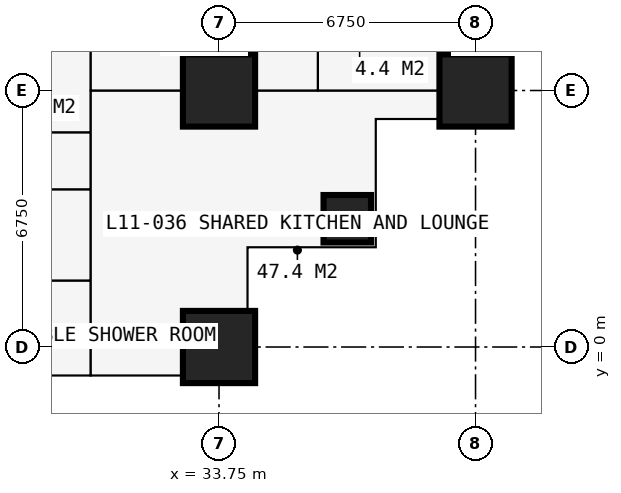
"""IFC4 building model, lengths in metres.
Left out: names, types, materials, properties, quantities, classifications, styles, units other than length and angle.
Written with IfcOpenShell. Run it as: python <this file> out.ifc"""

import sys

from ifc_helpers import new_model, si_unit, direction, frame, frame_2d, origin, origin_2d, place, context, subcontext, project, spatial, rectangle, extrude, element, fill, save


model = new_model("IFC4")
c1 = context("Model", 3, precision=1e-05, world=origin(), true_north=direction((0.0, 1.0)))
c2 = subcontext(c1, "Body", "Model", "MODEL_VIEW")
j1 = project(units=[si_unit("LENGTHUNIT", "METRE"), si_unit("PLANEANGLEUNIT", "RADIAN")], contexts=[c1])
p1 = place(None, origin())
s1 = spatial("IfcSite", under=j1, at=p1, CompositionType="ELEMENT")
p2 = place(p1, origin())
s2 = spatial("IfcBuilding", under=s1, at=p2, CompositionType="ELEMENT")
p3 = place(p2, frame((0.0, 0.0, 43.2)))
s3 = spatial("IfcBuildingStorey", under=s2, at=p3, CompositionType="ELEMENT", Elevation=43.2)
for number, where, z_axis, x_axis in (
    (1, (33.75, 0.0, 0.0), (0.0, 0.0, 1.0), (1.0, 0.0, 0.0)),
    (2, (33.75, 6.75, 0.0), (0.0, 0.0, 1.0), (1.0, 0.0, 0.0)),
):
    element("IfcColumn", number, at=place(p3, frame(where, z_axis=z_axis, x_axis=x_axis)), inside=s3, PredefinedType="COLUMN", context=c2, shape_type="SweptSolid", body=[
        extrude(rectangle(XDim=1.9, YDim=1.9, at=origin_2d()), origin(), (0.0, 0.0, 1.0), 3.6),
    ])
p4 = place(p3, frame((37.125, 3.375, 0.0), z_axis=(0.0, 0.0, 1.0), x_axis=(1.0, 0.0, 0.0)))
e3 = element("IfcColumn", 3, at=p4, inside=s3, PredefinedType="COLUMN", context=c2, shape_type="SweptSolid", body=[
    extrude(rectangle(XDim=1.25, YDim=1.25, at=origin_2d()), origin(), (0.0, 0.0, 1.0), 3.6),
])
p5 = place(p3, frame((40.5, 6.75, 0.0), z_axis=(0.0, 0.0, 1.0), x_axis=(1.0, 0.0, 0.0)))
e4 = element("IfcColumn", 4, at=p5, inside=s3, PredefinedType="COLUMN", context=c2, shape_type="SweptSolid", body=[
    extrude(rectangle(XDim=1.9, YDim=1.9, at=origin_2d()), origin(), (0.0, 0.0, 1.0), 3.6),
])
p6 = place(p3, frame((34.5, -0.75, 0.0), z_axis=(0.0, 0.0, 1.0), x_axis=(0.0, 1.0, 0.0)))
e5 = element("IfcWall", 5, at=p6, inside=s3, PredefinedType="SOLIDWALL", context=c2, shape_type="SweptSolid", body=[
    extrude(rectangle(XDim=3.375, YDim=0.3, at=frame_2d((1.688, 0.0))), origin(), (0.0, 0.0, 1.0), 3.375),
])
p7 = place(p6, frame((1.857, 0.0, 0.9)))
e6 = element("IfcOpeningElement", 6, at=p7, cuts=e5, PredefinedType="OPENING", context=c2, shape_type="SweptSolid", body=[
    extrude(rectangle(XDim=1.2, YDim=1.8, at=frame_2d((0.6, 0.9))), frame((0.0, 0.16, 0.0), z_axis=(0.0, -1.0, 0.0), x_axis=(1.0, 0.0, 0.0)), (0.0, 0.0, 1.0), 0.32),
])
p8 = place(p3, frame((34.5, 2.625, 0.0), z_axis=(0.0, 0.0, 1.0), x_axis=(1.0, 0.0, 0.0)))
e7 = element("IfcWall", 7, at=p8, inside=s3, PredefinedType="SOLIDWALL", context=c2, shape_type="SweptSolid", body=[
    extrude(rectangle(XDim=3.375, YDim=0.3, at=frame_2d((1.688, 0.0))), origin(), (0.0, 0.0, 1.0), 3.375),
])
p9 = place(p8, frame((0.788, 0.0, 0.6)))
e8 = element("IfcOpeningElement", 8, at=p9, cuts=e7, PredefinedType="OPENING", context=c2, shape_type="SweptSolid", body=[
    extrude(rectangle(XDim=1.8, YDim=2.1, at=frame_2d((0.9, 1.05))), frame((0.0, 0.16, 0.0), z_axis=(0.0, -1.0, 0.0), x_axis=(1.0, 0.0, 0.0)), (0.0, 0.0, 1.0), 0.32),
])
p10 = place(p3, frame((37.875, 2.625, 0.0), z_axis=(0.0, 0.0, 1.0), x_axis=(0.0, 1.0, 0.0)))
e9 = element("IfcWall", 9, at=p10, inside=s3, PredefinedType="SOLIDWALL", context=c2, shape_type="SweptSolid", body=[
    extrude(rectangle(XDim=3.375, YDim=0.3, at=frame_2d((1.688, 0.0))), origin(), (0.0, 0.0, 1.0), 3.375),
])
p11 = place(p10, frame((0.788, 0.0, 0.6)))
e10 = element("IfcOpeningElement", 10, at=p11, cuts=e9, PredefinedType="OPENING", context=c2, shape_type="SweptSolid", body=[
    extrude(rectangle(XDim=1.8, YDim=2.1, at=frame_2d((0.9, 1.05))), frame((0.0, 0.16, 0.0), z_axis=(0.0, -1.0, 0.0), x_axis=(1.0, 0.0, 0.0)), (0.0, 0.0, 1.0), 0.32),
])
p12 = place(p3, frame((37.875, 6.0, 0.0), z_axis=(0.0, 0.0, 1.0), x_axis=(1.0, 0.0, 0.0)))
e11 = element("IfcWall", 11, at=p12, inside=s3, PredefinedType="SOLIDWALL", context=c2, shape_type="SweptSolid", body=[
    extrude(rectangle(XDim=3.375, YDim=0.3, at=frame_2d((1.688, 0.0))), origin(), (0.0, 0.0, 1.0), 3.375),
])
p13 = place(p12, frame((0.317, 0.0, 0.9)))
e12 = element("IfcOpeningElement", 12, at=p13, cuts=e11, PredefinedType="OPENING", context=c2, shape_type="SweptSolid", body=[
    extrude(rectangle(XDim=1.2, YDim=1.8, at=frame_2d((0.6, 0.9))), frame((0.0, 0.16, 0.0), z_axis=(0.0, -1.0, 0.0), x_axis=(1.0, 0.0, 0.0)), (0.0, 0.0, 1.0), 0.32),
])
p14 = place(p3, frame((6.75, 4.15, 0.0), z_axis=(0.0, 0.0, 1.0), x_axis=(1.0, 0.0, 0.0)))
e13 = element("IfcWall", 13, at=p14, inside=s3, PredefinedType="PARTITIONING", context=c2, shape_type="SweptSolid", body=[
    extrude(rectangle(XDim=23.625, YDim=0.1, at=frame_2d((11.812, 0.0))), origin(), (0.0, 0.0, 1.0), 3.375),
])
p15 = place(p14, frame((0.2, 0.0, 0.0)))
e14 = element("IfcOpeningElement", 14, at=p15, cuts=e13, PredefinedType="OPENING", context=c2, shape_type="SweptSolid", body=[
    extrude(rectangle(XDim=0.95, YDim=2.2, at=frame_2d((0.475, 1.1))), frame((0.0, 0.06, 0.0), z_axis=(0.0, -1.0, 0.0), x_axis=(1.0, 0.0, 0.0)), (0.0, 0.0, 1.0), 0.12),
])
p16 = place(p14, frame((3.625, 0.0, 0.0)))
e15 = element("IfcOpeningElement", 15, at=p16, cuts=e13, PredefinedType="OPENING", context=c2, shape_type="SweptSolid", body=[
    extrude(rectangle(XDim=0.95, YDim=2.2, at=frame_2d((0.475, 1.1))), frame((0.0, 0.06, 0.0), z_axis=(0.0, -1.0, 0.0), x_axis=(1.0, 0.0, 0.0)), (0.0, 0.0, 1.0), 0.12),
])
p17 = place(p14, frame((7.0, 0.0, 0.0)))
e16 = element("IfcOpeningElement", 16, at=p17, cuts=e13, PredefinedType="OPENING", context=c2, shape_type="SweptSolid", body=[
    extrude(rectangle(XDim=0.95, YDim=2.2, at=frame_2d((0.475, 1.1))), frame((0.0, 0.06, 0.0), z_axis=(0.0, -1.0, 0.0), x_axis=(1.0, 0.0, 0.0)), (0.0, 0.0, 1.0), 0.12),
])
p18 = place(p14, frame((10.375, 0.0, 0.0)))
e17 = element("IfcOpeningElement", 17, at=p18, cuts=e13, PredefinedType="OPENING", context=c2, shape_type="SweptSolid", body=[
    extrude(rectangle(XDim=0.95, YDim=2.2, at=frame_2d((0.475, 1.1))), frame((0.0, 0.06, 0.0), z_axis=(0.0, -1.0, 0.0), x_axis=(1.0, 0.0, 0.0)), (0.0, 0.0, 1.0), 0.12),
])
p19 = place(p14, frame((18.475, 0.0, 0.0)))
e18 = element("IfcOpeningElement", 18, at=p19, cuts=e13, PredefinedType="OPENING", context=c2, shape_type="SweptSolid", body=[
    extrude(rectangle(XDim=0.95, YDim=2.2, at=frame_2d((0.475, 1.1))), frame((0.0, 0.06, 0.0), z_axis=(0.0, -1.0, 0.0), x_axis=(1.0, 0.0, 0.0)), (0.0, 0.0, 1.0), 0.12),
])
p20 = place(p14, frame((13.7, 0.0, 0.0)))
e19 = element("IfcOpeningElement", 19, at=p20, cuts=e13, PredefinedType="OPENING", context=c2, shape_type="SweptSolid", body=[
    extrude(rectangle(XDim=0.95, YDim=2.2, at=frame_2d((0.475, 1.1))), frame((0.0, 0.06, 0.0), z_axis=(0.0, -1.0, 0.0), x_axis=(1.0, 0.0, 0.0)), (0.0, 0.0, 1.0), 0.12),
])
p21 = place(p3, frame((22.988, 5.65, 0.0), z_axis=(0.0, 0.0, 1.0), x_axis=(1.0, 0.0, 0.0)))
e20 = element("IfcWall", 20, at=p21, inside=s3, PredefinedType="PARTITIONING", context=c2, shape_type="SweptSolid", body=[
    extrude(rectangle(XDim=7.387, YDim=0.15, at=frame_2d((3.694, 0.0))), origin(), (0.0, 0.0, 1.0), 3.375),
])
p22 = place(p21, frame((2.1, 0.0, 0.0)))
e21 = element("IfcOpeningElement", 21, at=p22, cuts=e20, PredefinedType="OPENING", context=c2, shape_type="SweptSolid", body=[
    extrude(rectangle(XDim=0.95, YDim=2.2, at=frame_2d((0.475, 1.1))), frame((0.0, 0.085, 0.0), z_axis=(0.0, -1.0, 0.0), x_axis=(1.0, 0.0, 0.0)), (0.0, 0.0, 1.0), 0.17),
])
p23 = place(p3, frame((27.775, 1.75, 0.0), z_axis=(0.0, 0.0, 1.0), x_axis=(1.0, 0.0, 0.0)))
e22 = element("IfcWall", 22, at=p23, inside=s3, PredefinedType="PARTITIONING", context=c2, shape_type="SweptSolid", body=[
    extrude(rectangle(XDim=2.6, YDim=0.1, at=frame_2d((1.3, 0.0))), origin(), (0.0, 0.0, 1.0), 3.375),
])
p24 = place(p23, frame((0.85, 0.0, 0.0)))
e23 = element("IfcOpeningElement", 23, at=p24, cuts=e22, PredefinedType="OPENING", context=c2, shape_type="SweptSolid", body=[
    extrude(rectangle(XDim=0.9, YDim=2.2, at=frame_2d((0.45, 1.1))), frame((0.0, 0.06, 0.0), z_axis=(0.0, -1.0, 0.0), x_axis=(1.0, 0.0, 0.0)), (0.0, 0.0, 1.0), 0.12),
])
p25 = place(p3, frame((30.375, -0.734, 0.0), z_axis=(0.0, 0.0, 1.0), x_axis=(0.0, 1.0, 0.0)))
e24 = element("IfcWall", 24, at=p25, inside=s3, PredefinedType="PARTITIONING", context=c2, shape_type="SweptSolid", body=[
    extrude(rectangle(XDim=12.034, YDim=0.15, at=frame_2d((6.017, 0.0))), origin(), (0.0, 0.0, 1.0), 3.375),
])
p26 = place(p3, frame((30.375, 6.75, 0.0), z_axis=(0.0, 0.0, 1.0), x_axis=(1.0, 0.0, 0.0)))
e25 = element("IfcWall", 25, at=p26, inside=s3, PredefinedType="PARTITIONING", context=c2, shape_type="SweptSolid", body=[
    extrude(rectangle(XDim=10.859, YDim=0.15, at=frame_2d((5.429, 0.0))), origin(), (0.0, 0.0, 1.0), 2.877),
])
p27 = place(p26, frame((1.4, 0.0, 0.0)))
e26 = element("IfcOpeningElement", 26, at=p27, cuts=e25, PredefinedType="OPENING", context=c2, shape_type="SweptSolid", body=[
    extrude(rectangle(XDim=1.0, YDim=2.2, at=frame_2d((0.5, 1.1))), frame((0.0, 0.085, 0.0), z_axis=(0.0, -1.0, 0.0), x_axis=(1.0, 0.0, 0.0)), (0.0, 0.0, 1.0), 0.17),
])
p28 = place(p3, frame((36.35, 6.75, 0.0), z_axis=(0.0, 0.0, 1.0), x_axis=(0.0, 1.0, 0.0)))
e27 = element("IfcWall", 27, at=p28, inside=s3, PredefinedType="PARTITIONING", context=c2, shape_type="SweptSolid", body=[
    extrude(rectangle(XDim=23.625, YDim=0.15, at=frame_2d((11.812, 0.0))), origin(), (0.0, 0.0, 1.0), 3.375),
])
p29 = place(p28, frame((0.2, 0.0, 0.0)))
e28 = element("IfcOpeningElement", 28, at=p29, cuts=e27, PredefinedType="OPENING", context=c2, shape_type="SweptSolid", body=[
    extrude(rectangle(XDim=0.95, YDim=2.2, at=frame_2d((0.475, 1.1))), frame((0.0, 0.085, 0.0), z_axis=(0.0, -1.0, 0.0), x_axis=(1.0, 0.0, 0.0)), (0.0, 0.0, 1.0), 0.17),
])
p30 = place(p28, frame((18.475, 0.0, 0.0)))
e29 = element("IfcOpeningElement", 29, at=p30, cuts=e27, PredefinedType="OPENING", context=c2, shape_type="SweptSolid", body=[
    extrude(rectangle(XDim=0.95, YDim=2.2, at=frame_2d((0.475, 1.1))), frame((0.0, 0.085, 0.0), z_axis=(0.0, -1.0, 0.0), x_axis=(1.0, 0.0, 0.0)), (0.0, 0.0, 1.0), 0.17),
])
p31 = place(p28, frame((11.725, 0.0, 0.0)))
e30 = element("IfcOpeningElement", 30, at=p31, cuts=e27, PredefinedType="OPENING", context=c2, shape_type="SweptSolid", body=[
    extrude(rectangle(XDim=0.95, YDim=2.2, at=frame_2d((0.475, 1.1))), frame((0.0, 0.085, 0.0), z_axis=(0.0, -1.0, 0.0), x_axis=(1.0, 0.0, 0.0)), (0.0, 0.0, 1.0), 0.17),
])
p32 = place(p28, frame((4.975, 0.0, 0.0)))
e31 = element("IfcOpeningElement", 31, at=p32, cuts=e27, PredefinedType="OPENING", context=c2, shape_type="SweptSolid", body=[
    extrude(rectangle(XDim=0.95, YDim=2.2, at=frame_2d((0.475, 1.1))), frame((0.0, 0.085, 0.0), z_axis=(0.0, -1.0, 0.0), x_axis=(1.0, 0.0, 0.0)), (0.0, 0.0, 1.0), 0.17),
])
p33 = place(p7, origin())
e32 = element("IfcWindow", 32, at=p33, inside=s3, PartitioningType="SINGLE_PANEL", PredefinedType="WINDOW", context=c2, shape_type="SweptSolid", body=[
    extrude(rectangle(XDim=1.2, YDim=1.8, at=frame_2d((0.6, 0.9))), frame((0.0, 0.03, 0.0), z_axis=(0.0, -1.0, 0.0), x_axis=(1.0, 0.0, 0.0)), (0.0, 0.0, 1.0), 0.06),
])
fill(e6, e32)
p34 = place(p9, origin())
e33 = element("IfcWindow", 33, at=p34, inside=s3, PartitioningType="SINGLE_PANEL", PredefinedType="WINDOW", context=c2, shape_type="SweptSolid", body=[
    extrude(rectangle(XDim=1.8, YDim=2.1, at=frame_2d((0.9, 1.05))), frame((0.0, 0.03, 0.0), z_axis=(0.0, -1.0, 0.0), x_axis=(1.0, 0.0, 0.0)), (0.0, 0.0, 1.0), 0.06),
])
fill(e8, e33)
p35 = place(p11, origin())
e34 = element("IfcWindow", 34, at=p35, inside=s3, PartitioningType="SINGLE_PANEL", PredefinedType="WINDOW", context=c2, shape_type="SweptSolid", body=[
    extrude(rectangle(XDim=1.8, YDim=2.1, at=frame_2d((0.9, 1.05))), frame((0.0, 0.03, 0.0), z_axis=(0.0, -1.0, 0.0), x_axis=(1.0, 0.0, 0.0)), (0.0, 0.0, 1.0), 0.06),
])
fill(e10, e34)
p36 = place(p13, origin())
e35 = element("IfcWindow", 35, at=p36, inside=s3, PartitioningType="SINGLE_PANEL", PredefinedType="WINDOW", context=c2, shape_type="SweptSolid", body=[
    extrude(rectangle(XDim=1.2, YDim=1.8, at=frame_2d((0.6, 0.9))), frame((0.0, 0.03, 0.0), z_axis=(0.0, -1.0, 0.0), x_axis=(1.0, 0.0, 0.0)), (0.0, 0.0, 1.0), 0.06),
])
fill(e12, e35)
p37 = place(p24, origin())
e36 = element("IfcDoor", 36, at=p37, inside=s3, OperationType="SINGLE_SWING_RIGHT", PredefinedType="DOOR", context=c2, shape_type="SweptSolid", body=[
    extrude(rectangle(XDim=0.9, YDim=2.2, at=frame_2d((0.45, 1.1))), frame((0.0, 0.025, 0.0), z_axis=(0.0, -1.0, 0.0), x_axis=(1.0, 0.0, 0.0)), (0.0, 0.0, 1.0), 0.05),
])
fill(e23, e36)
p38 = place(p27, origin())
e37 = element("IfcDoor", 37, at=p38, inside=s3, OperationType="SINGLE_SWING_LEFT", PredefinedType="DOOR", context=c2, shape_type="SweptSolid", body=[
    extrude(rectangle(XDim=1.0, YDim=2.2, at=frame_2d((0.5, 1.1))), frame((0.0, 0.025, 0.0), z_axis=(0.0, -1.0, 0.0), x_axis=(1.0, 0.0, 0.0)), (0.0, 0.0, 1.0), 0.05),
])
fill(e26, e37)
p39 = place(p29, origin())
e38 = element("IfcDoor", 38, at=p39, inside=s3, OperationType="SINGLE_SWING_LEFT", PredefinedType="DOOR", context=c2, shape_type="SweptSolid", body=[
    extrude(rectangle(XDim=0.95, YDim=2.2, at=frame_2d((0.475, 1.1))), frame((0.0, 0.025, 0.0), z_axis=(0.0, -1.0, 0.0), x_axis=(1.0, 0.0, 0.0)), (0.0, 0.0, 1.0), 0.05),
])
fill(e28, e38)
save(model, sys.argv[1])
